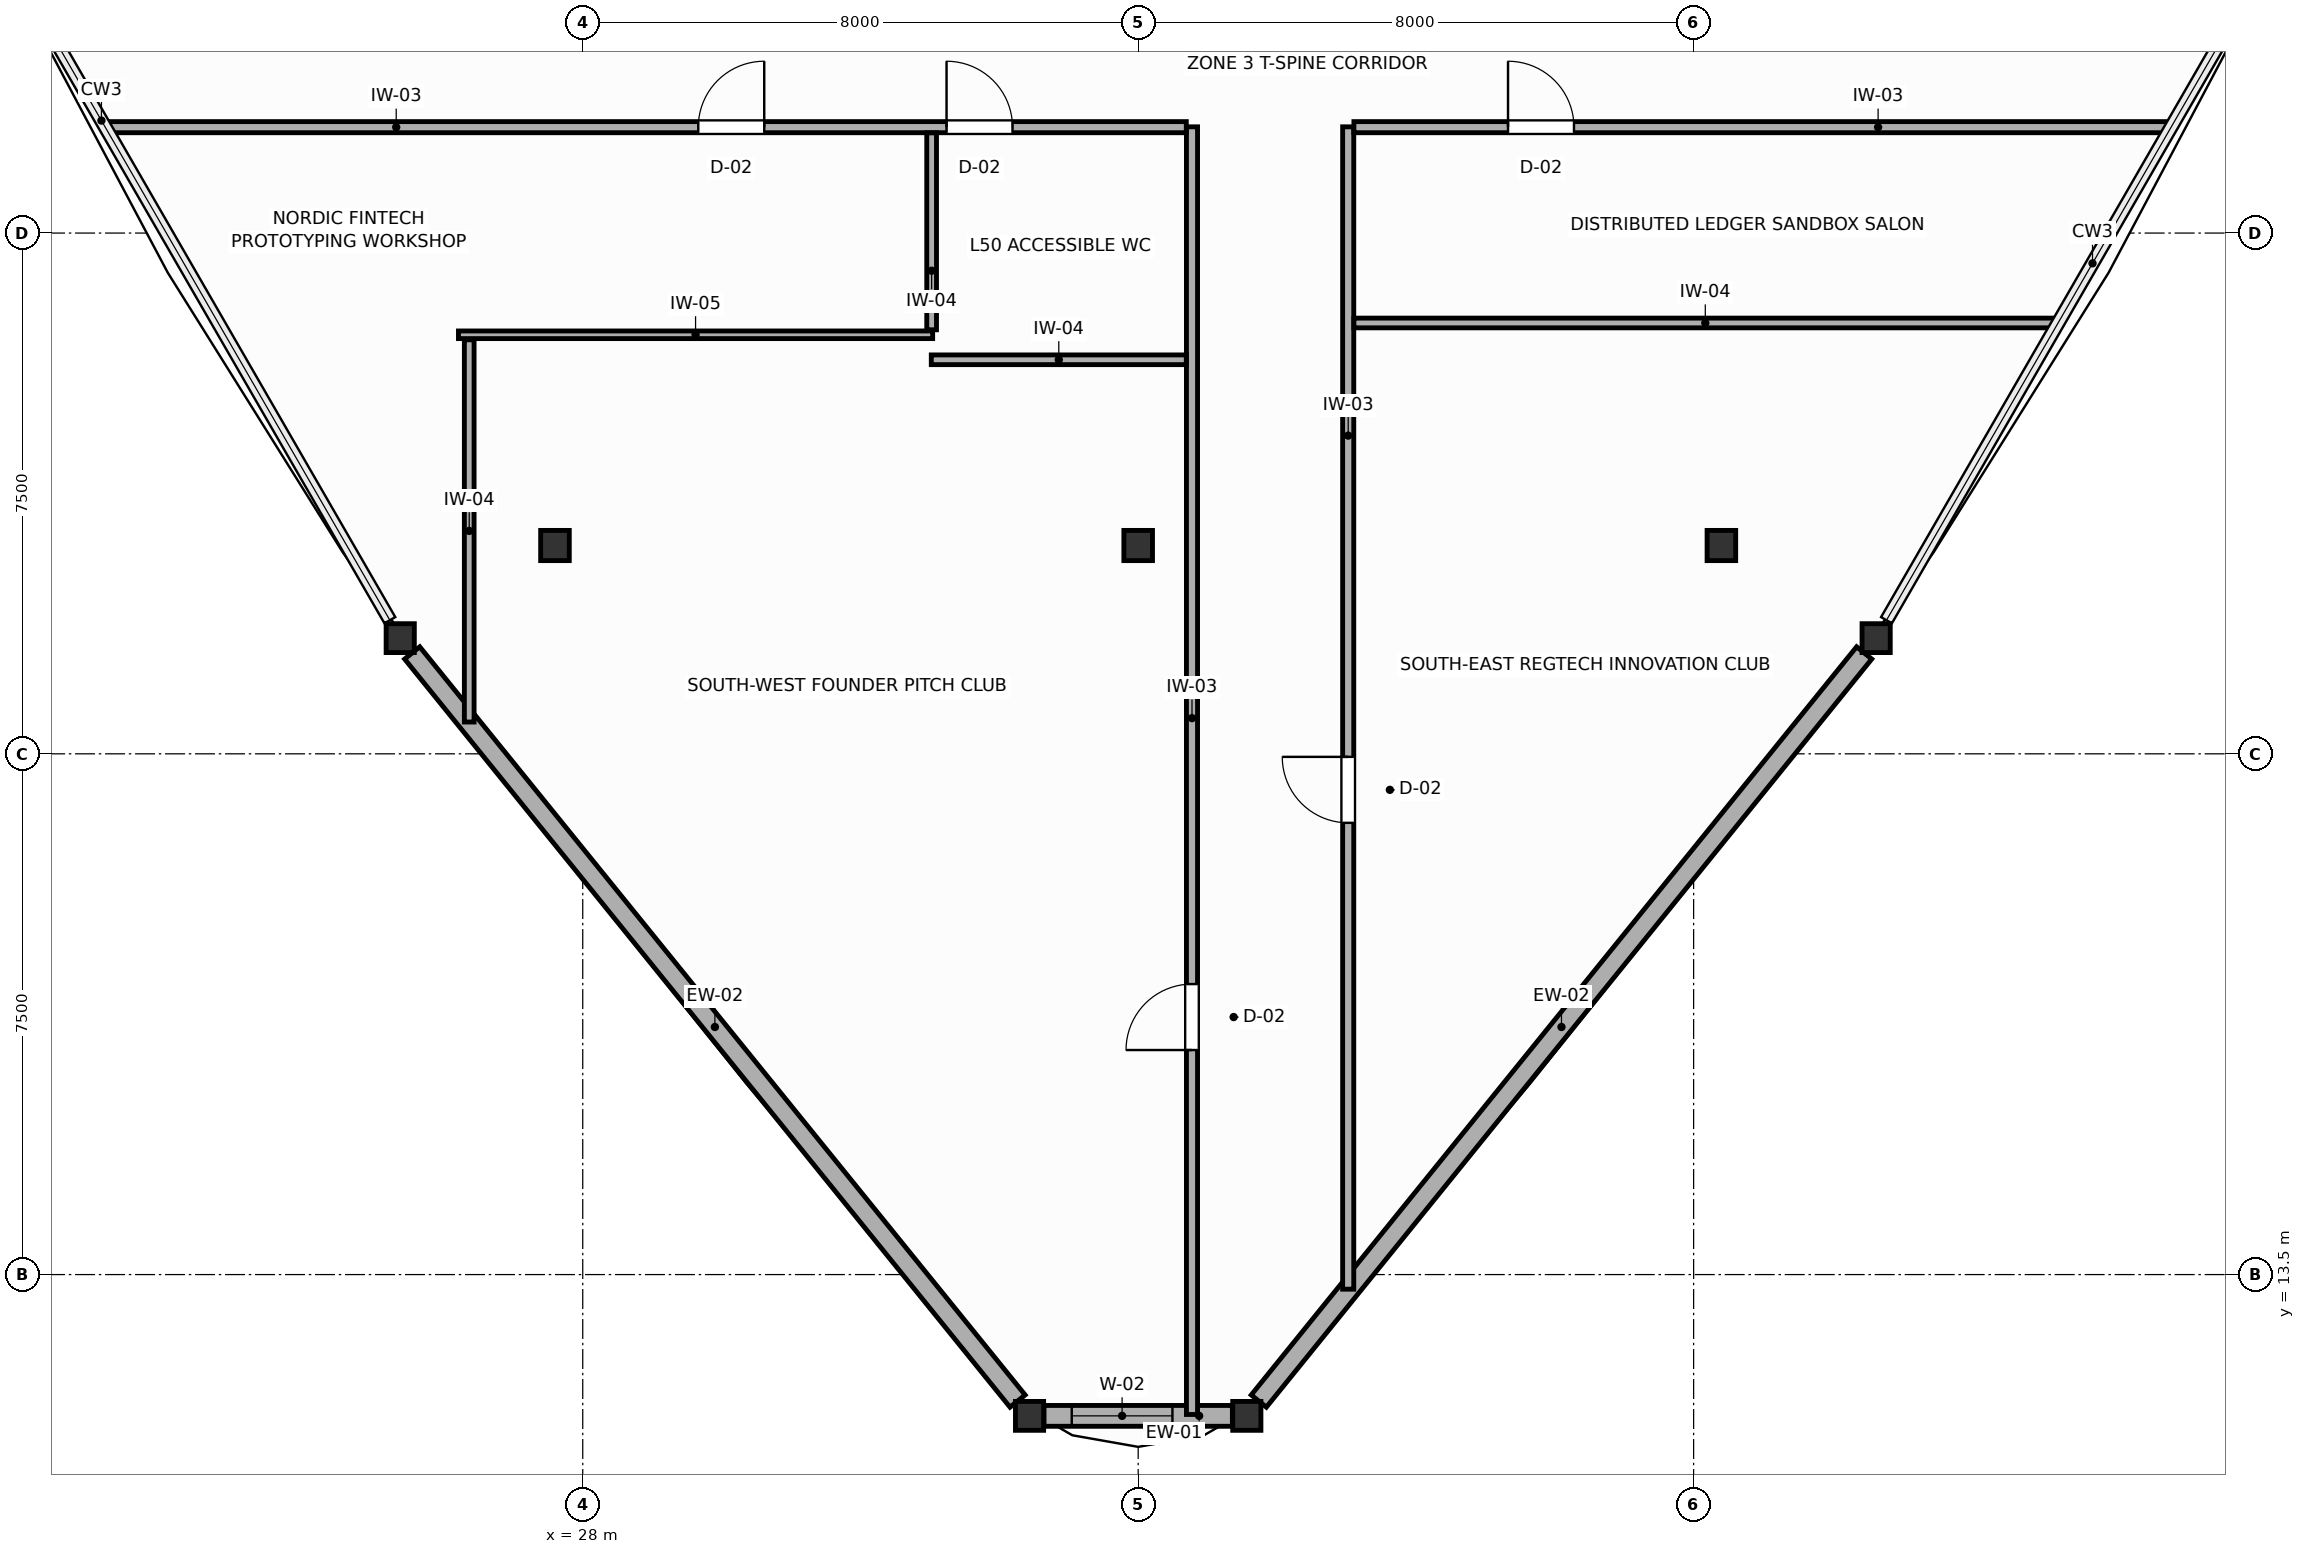
"""IFC4 building model, lengths in metres.
Left out: names, types, materials, properties, quantities, classifications, styles, units other than length and angle.
Written with IfcOpenShell. Run it as: python <this file> out.ifc"""

import sys

from ifc_helpers import new_model, si_unit, direction, frame, frame_2d, origin, origin_2d, place, context, subcontext, project, spatial, rectangle, i_section, extrude, source, transform, mapped, element, fill, save


model = new_model("IFC4")
c1 = context("Model", 3, precision=1e-05, world=origin(), true_north=direction((0.0, 1.0)))
c2 = subcontext(c1, "Body", "Model", "MODEL_VIEW")
j1 = project(units=[si_unit("LENGTHUNIT", "METRE"), si_unit("PLANEANGLEUNIT", "RADIAN")], contexts=[c1])
p1 = place(None, origin())
s1 = spatial("IfcSite", under=j1, at=p1, CompositionType="ELEMENT")
p2 = place(p1, origin())
s2 = spatial("IfcBuilding", under=s1, at=p2, CompositionType="ELEMENT")
p3 = place(p2, frame((0.0, 0.0, 193.8)))
s3 = spatial("IfcBuildingStorey", under=s2, at=p3, CompositionType="ELEMENT", Elevation=193.8)
m1 = source(origin(), c2, "Body", "SweptSolid", [
    extrude(i_section(OverallWidth=0.412, OverallDepth=0.435, WebThickness=0.033, FlangeThickness=0.053, FilletRadius=0.015, at=origin_2d()), origin(), (0.0, 0.0, 1.0), 3.6),
])
for number, where, z_axis, x_axis in (
    (1, (27.6, 24.0, 0.0), (0.0, 0.0, 1.0), (1.0, 0.0, 0.0)),
    (2, (44.4, 24.0, 0.0), (0.0, 0.0, 1.0), (1.0, 0.0, 0.0)),
    (3, (36.0, 24.0, 0.0), (0.0, 0.0, 1.0), (1.0, 0.0, 0.0)),
):
    element("IfcColumn", number, at=place(p3, frame(where, z_axis=z_axis, x_axis=x_axis)), inside=s3, PredefinedType="COLUMN", context=c2, shape_type="MappedRepresentation", body=[
        mapped(m1, transform((0.0, 0.0, 0.0), scale=1.0)),
    ])
m2 = source(origin(), c2, "Body", "SweptSolid", [
    extrude(i_section(OverallWidth=0.406, OverallDepth=0.416, WebThickness=0.027, FlangeThickness=0.044, FilletRadius=0.015, at=origin_2d()), origin(), (0.0, 0.0, 1.0), 3.6),
])
for number, where, z_axis, x_axis in (
    (4, (25.371, 22.666, 0.0), (0.0, 0.0, 1.0), (1.0, 0.0, 0.0)),
    (5, (34.435, 11.465, 0.0), (0.0, 0.0, 1.0), (1.0, 0.0, 0.0)),
    (6, (37.565, 11.465, 0.0), (0.0, 0.0, 1.0), (1.0, 0.0, 0.0)),
    (7, (46.629, 22.666, 0.0), (0.0, 0.0, 1.0), (1.0, 0.0, 0.0)),
):
    element("IfcColumn", number, at=place(p3, frame(where, z_axis=z_axis, x_axis=x_axis)), inside=s3, PredefinedType="COLUMN", context=c2, shape_type="MappedRepresentation", body=[
        mapped(m2, transform((0.0, 0.0, 0.0), scale=1.0)),
    ])
p4 = place(p3, frame((25.544, 22.453, 0.0), z_axis=(0.0, 0.0, 1.0), x_axis=(0.629045703635, -0.777368318584, 0.0)))
e8 = element("IfcWall", 8, at=p4, inside=s3, PredefinedType="SOLIDWALL", context=c2, shape_type="SweptSolid", body=[
    extrude(rectangle(XDim=13.861, YDim=0.28, at=frame_2d((6.931, 0.0))), origin(), (0.0, 0.0, 1.0), 3.01),
])
p5 = place(p3, frame((34.643, 11.465, 0.0), z_axis=(0.0, 0.0, 1.0), x_axis=(1.0, 0.0, 0.0)))
e9 = element("IfcWall", 9, at=p5, inside=s3, PredefinedType="SOLIDWALL", context=c2, shape_type="SweptSolid", body=[
    extrude(rectangle(XDim=2.713, YDim=0.3, at=frame_2d((1.357, 0.0))), origin(), (0.0, 0.0, 1.0), 3.01),
])
p6 = place(p5, frame((0.4, 0.0, 0.75)))
e10 = element("IfcOpeningElement", 10, at=p6, cuts=e9, PredefinedType="OPENING", context=c2, shape_type="SweptSolid", body=[
    extrude(rectangle(XDim=1.45, YDim=1.65, at=frame_2d((0.725, 0.825))), frame((0.0, 0.16, 0.0), z_axis=(0.0, -1.0, 0.0), x_axis=(1.0, 0.0, 0.0)), (0.0, 0.0, 1.0), 0.32),
])
p7 = place(p3, frame((37.737, 11.678, 0.0), z_axis=(0.0, 0.0, 1.0), x_axis=(0.629045703635, 0.777368318584, 0.0)))
e11 = element("IfcWall", 11, at=p7, inside=s3, PredefinedType="SOLIDWALL", context=c2, shape_type="SweptSolid", body=[
    extrude(rectangle(XDim=13.861, YDim=0.28, at=frame_2d((6.931, 0.0))), origin(), (0.0, 0.0, 1.0), 3.01),
])
p8 = place(p3, frame((36.775, 11.485, 0.0), z_axis=(0.0, 0.0, 1.0), x_axis=(0.0, 1.0, 0.0)))
e12 = element("IfcWall", 12, at=p8, inside=s3, PredefinedType="PARTITIONING", context=c2, shape_type="SweptSolid", body=[
    extrude(rectangle(XDim=18.545, YDim=0.16, at=frame_2d((9.272, 0.0))), origin(), (0.0, 0.0, 1.0), 2.95),
])
p9 = place(p8, frame((5.249, 0.0, 0.0)))
e13 = element("IfcOpeningElement", 13, at=p9, cuts=e12, PredefinedType="OPENING", context=c2, shape_type="SweptSolid", body=[
    extrude(rectangle(XDim=0.95, YDim=2.05, at=frame_2d((0.475, 1.025))), frame((0.0, 0.09, 0.0), z_axis=(0.0, -1.0, 0.0), x_axis=(1.0, 0.0, 0.0)), (0.0, 0.0, 1.0), 0.18),
])
p10 = place(p3, frame((39.025, 13.29, 0.0), z_axis=(0.0, 0.0, 1.0), x_axis=(0.0, 1.0, 0.0)))
e14 = element("IfcWall", 14, at=p10, inside=s3, PredefinedType="PARTITIONING", context=c2, shape_type="SweptSolid", body=[
    extrude(rectangle(XDim=16.74, YDim=0.16, at=frame_2d((8.37, 0.0))), origin(), (0.0, 0.0, 1.0), 3.4),
])
p11 = place(p10, frame((6.716, 0.0, 0.0)))
e15 = element("IfcOpeningElement", 15, at=p11, cuts=e14, PredefinedType="OPENING", context=c2, shape_type="SweptSolid", body=[
    extrude(rectangle(XDim=0.95, YDim=2.05, at=frame_2d((0.475, 1.025))), frame((0.0, 0.09, 0.0), z_axis=(0.0, -1.0, 0.0), x_axis=(1.0, 0.0, 0.0)), (0.0, 0.0, 1.0), 0.18),
])
p12 = place(p3, frame((21.143, 30.025, 0.0), z_axis=(0.0, 0.0, 1.0), x_axis=(1.0, 0.0, 0.0)))
e16 = element("IfcWall", 16, at=p12, inside=s3, PredefinedType="PARTITIONING", context=c2, shape_type="SweptSolid", body=[
    extrude(rectangle(XDim=15.551, YDim=0.16, at=frame_2d((7.775, 0.0))), origin(), (0.0, 0.0, 1.0), 3.4),
])
p13 = place(p12, frame((12.097, 0.0, 0.0)))
e17 = element("IfcOpeningElement", 17, at=p13, cuts=e16, PredefinedType="OPENING", context=c2, shape_type="SweptSolid", body=[
    extrude(rectangle(XDim=0.95, YDim=2.05, at=frame_2d((0.475, 1.025))), frame((0.0, 0.09, 0.0), z_axis=(0.0, -1.0, 0.0), x_axis=(1.0, 0.0, 0.0)), (0.0, 0.0, 1.0), 0.18),
])
p14 = place(p12, frame((8.521, 0.0, 0.0)))
e18 = element("IfcOpeningElement", 18, at=p14, cuts=e16, PredefinedType="OPENING", context=c2, shape_type="SweptSolid", body=[
    extrude(rectangle(XDim=0.95, YDim=2.05, at=frame_2d((0.475, 1.025))), frame((0.0, 0.09, 0.0), z_axis=(0.0, -1.0, 0.0), x_axis=(1.0, 0.0, 0.0)), (0.0, 0.0, 1.0), 0.18),
])
p15 = place(p3, frame((39.107, 30.025, 0.0), z_axis=(0.0, 0.0, 1.0), x_axis=(1.0, 0.0, 0.0)))
e19 = element("IfcWall", 19, at=p15, inside=s3, PredefinedType="PARTITIONING", context=c2, shape_type="SweptSolid", body=[
    extrude(rectangle(XDim=11.75, YDim=0.16, at=frame_2d((5.875, 0.0))), origin(), (0.0, 0.0, 1.0), 3.4),
])
p16 = place(p15, frame((2.22, 0.0, 0.0)))
e20 = element("IfcOpeningElement", 20, at=p16, cuts=e19, PredefinedType="OPENING", context=c2, shape_type="SweptSolid", body=[
    extrude(rectangle(XDim=0.95, YDim=2.05, at=frame_2d((0.475, 1.025))), frame((0.0, 0.09, 0.0), z_axis=(0.0, -1.0, 0.0), x_axis=(1.0, 0.0, 0.0)), (0.0, 0.0, 1.0), 0.18),
])
p17 = place(p3, frame((39.107, 27.205, 0.0), z_axis=(0.0, 0.0, 1.0), x_axis=(1.0, 0.0, 0.0)))
e21 = element("IfcWall", 21, at=p17, inside=s3, PredefinedType="PARTITIONING", context=c2, shape_type="SweptSolid", body=[
    extrude(rectangle(XDim=10.122, YDim=0.14, at=frame_2d((5.061, 0.0))), origin(), (0.0, 0.0, 1.0), 3.4),
])
p18 = place(p3, frame((26.21, 27.035, 0.0), z_axis=(0.0, 0.0, 1.0), x_axis=(1.0, 0.0, 0.0)))
e22 = element("IfcWall", 22, at=p18, inside=s3, PredefinedType="MOVABLE", context=c2, shape_type="SweptSolid", body=[
    extrude(rectangle(XDim=6.83, YDim=0.11, at=frame_2d((3.415, 0.0))), origin(), (0.0, 0.0, 1.0), 3.4),
])
p19 = place(p3, frame((26.365, 21.458, 0.0), z_axis=(0.0, 0.0, 1.0), x_axis=(0.0, 1.0, 0.0)))
e23 = element("IfcWall", 23, at=p19, inside=s3, PredefinedType="PARTITIONING", context=c2, shape_type="SweptSolid", body=[
    extrude(rectangle(XDim=5.505, YDim=0.14, at=frame_2d((2.752, 0.0))), origin(), (0.0, 0.0, 1.0), 3.4),
])
p20 = place(p3, frame((33.02, 26.675, 0.0), z_axis=(0.0, 0.0, 1.0), x_axis=(1.0, 0.0, 0.0)))
e24 = element("IfcWall", 24, at=p20, inside=s3, PredefinedType="PARTITIONING", context=c2, shape_type="SweptSolid", body=[
    extrude(rectangle(XDim=3.673, YDim=0.14, at=frame_2d((1.836, 0.0))), origin(), (0.0, 0.0, 1.0), 3.4),
])
p21 = place(p3, frame((33.025, 27.107, 0.0), z_axis=(0.0, 0.0, 1.0), x_axis=(0.0, 1.0, 0.0)))
e25 = element("IfcWall", 25, at=p21, inside=s3, PredefinedType="PARTITIONING", context=c2, shape_type="SweptSolid", body=[
    extrude(rectangle(XDim=2.836, YDim=0.14, at=frame_2d((1.418, 0.0))), origin(), (0.0, 0.0, 1.0), 3.4),
])
p22 = place(p6, origin())
e26 = element("IfcWindow", 26, at=p22, inside=s3, PartitioningType="SINGLE_PANEL", PredefinedType="WINDOW", context=c2, shape_type="SweptSolid", body=[
    extrude(rectangle(XDim=1.45, YDim=1.65, at=frame_2d((0.725, 0.825))), frame((0.0, 0.03, 0.0), z_axis=(0.0, -1.0, 0.0), x_axis=(1.0, 0.0, 0.0)), (0.0, 0.0, 1.0), 0.06),
])
fill(e10, e26)
p23 = place(p9, origin())
e27 = element("IfcDoor", 27, at=p23, inside=s3, OperationType="SINGLE_SWING_LEFT", PredefinedType="DOOR", context=c2, shape_type="SweptSolid", body=[
    extrude(rectangle(XDim=0.95, YDim=2.05, at=frame_2d((0.475, 1.025))), frame((0.0, 0.025, 0.0), z_axis=(0.0, -1.0, 0.0), x_axis=(1.0, 0.0, 0.0)), (0.0, 0.0, 1.0), 0.05),
])
fill(e13, e27)
p24 = place(p11, origin())
e28 = element("IfcDoor", 28, at=p24, inside=s3, OperationType="SINGLE_SWING_RIGHT", PredefinedType="DOOR", context=c2, shape_type="SweptSolid", body=[
    extrude(rectangle(XDim=0.95, YDim=2.05, at=frame_2d((0.475, 1.025))), frame((0.0, 0.025, 0.0), z_axis=(0.0, -1.0, 0.0), x_axis=(1.0, 0.0, 0.0)), (0.0, 0.0, 1.0), 0.05),
])
fill(e15, e28)
p25 = place(p13, origin())
e29 = element("IfcDoor", 29, at=p25, inside=s3, OperationType="SINGLE_SWING_LEFT", PredefinedType="DOOR", context=c2, shape_type="SweptSolid", body=[
    extrude(rectangle(XDim=0.95, YDim=2.05, at=frame_2d((0.475, 1.025))), frame((0.0, 0.025, 0.0), z_axis=(0.0, -1.0, 0.0), x_axis=(1.0, 0.0, 0.0)), (0.0, 0.0, 1.0), 0.05),
])
fill(e17, e29)
p26 = place(p14, origin())
e30 = element("IfcDoor", 30, at=p26, inside=s3, OperationType="SINGLE_SWING_RIGHT", PredefinedType="DOOR", context=c2, shape_type="SweptSolid", body=[
    extrude(rectangle(XDim=0.95, YDim=2.05, at=frame_2d((0.475, 1.025))), frame((0.0, 0.025, 0.0), z_axis=(0.0, -1.0, 0.0), x_axis=(1.0, 0.0, 0.0)), (0.0, 0.0, 1.0), 0.05),
])
fill(e18, e30)
p27 = place(p16, origin())
e31 = element("IfcDoor", 31, at=p27, inside=s3, OperationType="SINGLE_SWING_LEFT", PredefinedType="DOOR", context=c2, shape_type="SweptSolid", body=[
    extrude(rectangle(XDim=0.95, YDim=2.05, at=frame_2d((0.475, 1.025))), frame((0.0, 0.025, 0.0), z_axis=(0.0, -1.0, 0.0), x_axis=(1.0, 0.0, 0.0)), (0.0, 0.0, 1.0), 0.05),
])
fill(e20, e31)
save(model, sys.argv[1])
